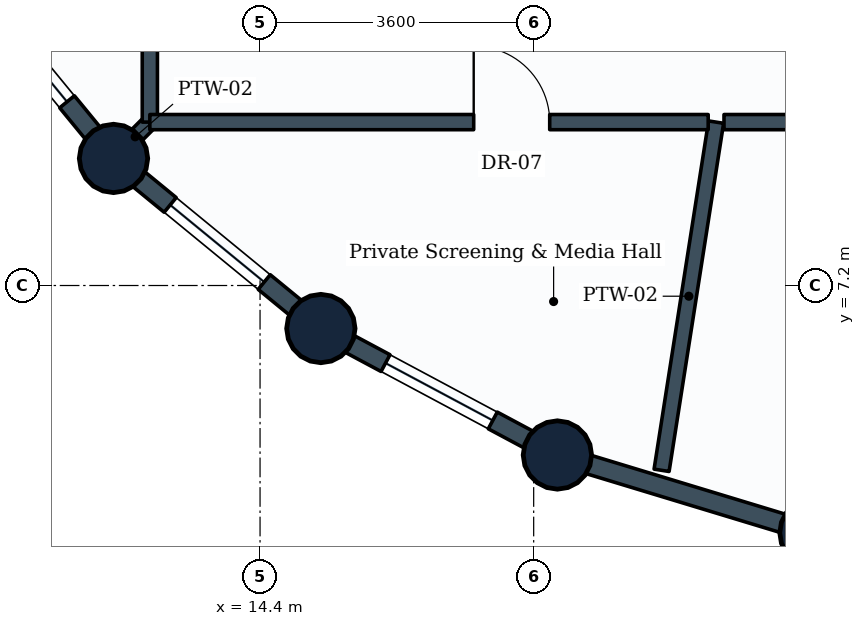
"""IFC4 building model, lengths in metres.
Left out: names, types, materials, properties, quantities, classifications, styles, units other than length and angle.
Written with IfcOpenShell. Run it as: python <this file> out.ifc"""

import sys

from ifc_helpers import new_model, si_unit, direction, frame, frame_2d, origin, origin_2d, place, context, subcontext, project, spatial, rectangle, circle, extrude, element, fill, save


model = new_model("IFC4")
c1 = context("Model", 3, precision=1e-05, world=origin(), true_north=direction((0.0, 1.0)))
c2 = subcontext(c1, "Body", "Model", "MODEL_VIEW")
j1 = project(units=[si_unit("LENGTHUNIT", "METRE"), si_unit("PLANEANGLEUNIT", "RADIAN")], contexts=[c1])
p1 = place(None, origin())
s1 = spatial("IfcSite", under=j1, at=p1, CompositionType="ELEMENT")
p2 = place(p1, origin())
s2 = spatial("IfcBuilding", under=s1, at=p2, CompositionType="ELEMENT")
p3 = place(p2, frame((0.0, 0.0, 231.8)))
s3 = spatial("IfcBuildingStorey", under=s2, at=p3, CompositionType="ELEMENT", Elevation=231.8)
for number, where, z_axis, x_axis in (
    (1, (12.472, 8.872, 0.0), (0.0, 0.0, 1.0), (1.0, 0.0, 0.0)),
    (2, (15.2, 6.634, 0.0), (0.0, 0.0, 1.0), (1.0, 0.0, 0.0)),
    (3, (18.312, 4.97, 0.0), (0.0, 0.0, 1.0), (1.0, 0.0, 0.0)),
    (4, (21.688, 3.946, 0.0), (0.0, 0.0, 1.0), (1.0, 0.0, 0.0)),
):
    element("IfcColumn", number, at=place(p3, frame(where, z_axis=z_axis, x_axis=x_axis)), inside=s3, PredefinedType="COLUMN", context=c2, shape_type="SweptSolid", body=[
        extrude(circle(Radius=0.45, at=origin_2d()), origin(), (0.0, 0.0, 1.0), 3.6),
    ])
p4 = place(p3, frame((12.472, 8.872, 0.0), z_axis=(0.0, 0.0, 1.0), x_axis=(-0.634258295121, 0.773121216285, 0.0)))
e5 = element("IfcWall", 5, at=p4, inside=s3, PredefinedType="STANDARD", context=c2, shape_type="SweptSolid", body=[
    extrude(rectangle(XDim=3.529, YDim=0.25, at=frame_2d((1.764, 0.0))), origin(), (0.0, 0.0, 1.0), 2.83),
])
p5 = place(p4, frame((0.964, 0.0, 0.85)))
e6 = element("IfcOpeningElement", 6, at=p5, cuts=e5, PredefinedType="OPENING", context=c2, shape_type="SweptSolid", body=[
    extrude(rectangle(XDim=1.6, YDim=1.35, at=frame_2d((0.8, 0.675))), frame((0.0, 0.135, 0.0), z_axis=(0.0, -1.0, 0.0), x_axis=(1.0, 0.0, 0.0)), (0.0, 0.0, 1.0), 0.27),
])
p6 = place(p3, frame((15.2, 6.634, 0.0), z_axis=(0.0, 0.0, 1.0), x_axis=(-0.773121216285, 0.634258295121, 0.0)))
e7 = element("IfcWall", 7, at=p6, inside=s3, PredefinedType="STANDARD", context=c2, shape_type="SweptSolid", body=[
    extrude(rectangle(XDim=3.529, YDim=0.25, at=frame_2d((1.764, 0.0))), origin(), (0.0, 0.0, 1.0), 2.83),
])
p7 = place(p6, frame((0.964, 0.0, 0.85)))
e8 = element("IfcOpeningElement", 8, at=p7, cuts=e7, PredefinedType="OPENING", context=c2, shape_type="SweptSolid", body=[
    extrude(rectangle(XDim=1.6, YDim=1.35, at=frame_2d((0.8, 0.675))), frame((0.0, 0.135, 0.0), z_axis=(0.0, -1.0, 0.0), x_axis=(1.0, 0.0, 0.0)), (0.0, 0.0, 1.0), 0.27),
])
p8 = place(p3, frame((18.312, 4.97, 0.0), z_axis=(0.0, 0.0, 1.0), x_axis=(-0.881846862014, 0.471535907389, 0.0)))
e9 = element("IfcWall", 9, at=p8, inside=s3, PredefinedType="STANDARD", context=c2, shape_type="SweptSolid", body=[
    extrude(rectangle(XDim=3.529, YDim=0.25, at=frame_2d((1.765, 0.0))), origin(), (0.0, 0.0, 1.0), 2.83),
])
p9 = place(p8, frame((0.964, 0.0, 0.85)))
e10 = element("IfcOpeningElement", 10, at=p9, cuts=e9, PredefinedType="OPENING", context=c2, shape_type="SweptSolid", body=[
    extrude(rectangle(XDim=1.6, YDim=1.35, at=frame_2d((0.8, 0.675))), frame((0.0, 0.135, 0.0), z_axis=(0.0, -1.0, 0.0), x_axis=(1.0, 0.0, 0.0)), (0.0, 0.0, 1.0), 0.27),
])
p10 = place(p3, frame((21.688, 3.946, 0.0), z_axis=(0.0, 0.0, 1.0), x_axis=(-0.956953367403, 0.290241714123, 0.0)))
e11 = element("IfcWall", 11, at=p10, inside=s3, PredefinedType="STANDARD", context=c2, shape_type="SweptSolid", body=[
    extrude(rectangle(XDim=3.528, YDim=0.25, at=frame_2d((1.764, 0.0))), origin(), (0.0, 0.0, 1.0), 2.83),
])
p11 = place(p3, frame((12.95, 9.35, 0.0), z_axis=(0.0, 0.0, 1.0), x_axis=(-0.706883613527, -0.707329878435, 0.0)))
e12 = element("IfcWall", 12, at=p11, inside=s3, PredefinedType="PARTITIONING", context=c2, shape_type="SweptSolid", body=[
    extrude(rectangle(XDim=0.547, YDim=0.2, at=frame_2d((0.273, 0.0))), origin(), (0.0, 0.0, 1.0), 3.02),
])
p12 = place(p3, frame((20.4, 9.35, 0.0), z_axis=(0.0, 0.0, 1.0), x_axis=(-0.154564772307, -0.987982657318, 0.0)))
e13 = element("IfcWall", 13, at=p12, inside=s3, PredefinedType="PARTITIONING", context=c2, shape_type="SweptSolid", body=[
    extrude(rectangle(XDim=4.637, YDim=0.2, at=frame_2d((2.319, 0.0))), origin(), (0.0, 0.0, 1.0), 2.83),
])
p13 = place(p3, frame((12.95, 9.35, 0.0), z_axis=(0.0, 0.0, 1.0), x_axis=(0.0, 1.0, 0.0)))
e14 = element("IfcWall", 14, at=p13, inside=s3, PredefinedType="PARTITIONING", context=c2, shape_type="SweptSolid", body=[
    extrude(rectangle(XDim=7.346, YDim=0.2, at=frame_2d((3.673, 0.0))), origin(), (0.0, 0.0, 1.0), 3.02),
])
p14 = place(p13, frame((4.261, 0.0, 0.0)))
e15 = element("IfcOpeningElement", 15, at=p14, cuts=e14, PredefinedType="OPENING", context=c2, shape_type="SweptSolid", body=[
    extrude(rectangle(XDim=1.0, YDim=2.1, at=frame_2d((0.5, 1.05))), frame((0.0, 0.11, 0.0), z_axis=(0.0, -1.0, 0.0), x_axis=(1.0, 0.0, 0.0)), (0.0, 0.0, 1.0), 0.22),
])
p15 = place(p3, frame((12.95, 9.35, 0.0), z_axis=(0.0, 0.0, 1.0), x_axis=(1.0, 0.0, 0.0)))
e16 = element("IfcWall", 16, at=p15, inside=s3, PredefinedType="PARTITIONING", context=c2, shape_type="SweptSolid", body=[
    extrude(rectangle(XDim=7.346, YDim=0.2, at=frame_2d((3.673, 0.0))), origin(), (0.0, 0.0, 1.0), 3.02),
])
p16 = place(p15, frame((4.261, 0.0, 0.0)))
e17 = element("IfcOpeningElement", 17, at=p16, cuts=e16, PredefinedType="OPENING", context=c2, shape_type="SweptSolid", body=[
    extrude(rectangle(XDim=1.0, YDim=2.1, at=frame_2d((0.5, 1.05))), frame((0.0, 0.11, 0.0), z_axis=(0.0, -1.0, 0.0), x_axis=(1.0, 0.0, 0.0)), (0.0, 0.0, 1.0), 0.22),
])
p17 = place(p3, frame((20.504, 9.35, 0.0), z_axis=(0.0, 0.0, 1.0), x_axis=(1.0, 0.0, 0.0)))
e18 = element("IfcWall", 18, at=p17, inside=s3, PredefinedType="PARTITIONING", context=c2, shape_type="SweptSolid", body=[
    extrude(rectangle(XDim=8.217, YDim=0.2, at=frame_2d((4.108, 0.0))), origin(), (0.0, 0.0, 1.0), 3.02),
])
p18 = place(p17, frame((3.914, 0.0, 0.0)))
e19 = element("IfcOpeningElement", 19, at=p18, cuts=e18, PredefinedType="OPENING", context=c2, shape_type="SweptSolid", body=[
    extrude(rectangle(XDim=1.0, YDim=2.1, at=frame_2d((0.5, 1.05))), frame((0.0, 0.11, 0.0), z_axis=(0.0, -1.0, 0.0), x_axis=(1.0, 0.0, 0.0)), (0.0, 0.0, 1.0), 0.22),
])
p19 = place(p5, origin())
e20 = element("IfcWindow", 20, at=p19, inside=s3, PartitioningType="SINGLE_PANEL", PredefinedType="WINDOW", context=c2, shape_type="SweptSolid", body=[
    extrude(rectangle(XDim=1.6, YDim=1.35, at=frame_2d((0.8, 0.675))), frame((0.0, 0.03, 0.0), z_axis=(0.0, -1.0, 0.0), x_axis=(1.0, 0.0, 0.0)), (0.0, 0.0, 1.0), 0.06),
])
fill(e6, e20)
p20 = place(p7, origin())
e21 = element("IfcWindow", 21, at=p20, inside=s3, PartitioningType="SINGLE_PANEL", PredefinedType="WINDOW", context=c2, shape_type="SweptSolid", body=[
    extrude(rectangle(XDim=1.6, YDim=1.35, at=frame_2d((0.8, 0.675))), frame((0.0, 0.03, 0.0), z_axis=(0.0, -1.0, 0.0), x_axis=(1.0, 0.0, 0.0)), (0.0, 0.0, 1.0), 0.06),
])
fill(e8, e21)
p21 = place(p9, origin())
e22 = element("IfcWindow", 22, at=p21, inside=s3, PartitioningType="SINGLE_PANEL", PredefinedType="WINDOW", context=c2, shape_type="SweptSolid", body=[
    extrude(rectangle(XDim=1.6, YDim=1.35, at=frame_2d((0.8, 0.675))), frame((0.0, 0.03, 0.0), z_axis=(0.0, -1.0, 0.0), x_axis=(1.0, 0.0, 0.0)), (0.0, 0.0, 1.0), 0.06),
])
fill(e10, e22)
p22 = place(p16, origin())
e23 = element("IfcDoor", 23, at=p22, inside=s3, OperationType="SINGLE_SWING_LEFT", PredefinedType="DOOR", context=c2, shape_type="SweptSolid", body=[
    extrude(rectangle(XDim=1.0, YDim=2.1, at=frame_2d((0.5, 1.05))), frame((0.0, 0.025, 0.0), z_axis=(0.0, -1.0, 0.0), x_axis=(1.0, 0.0, 0.0)), (0.0, 0.0, 1.0), 0.05),
])
fill(e17, e23)
save(model, sys.argv[1])
